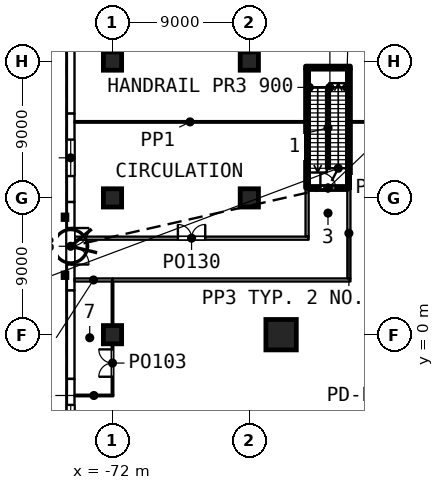
"""IFC4 building model, lengths in metres.
Left out: names, types, materials, properties, quantities, classifications, styles, units other than length and angle.
Written with IfcOpenShell. Run it as: python <this file> out.ifc"""

import sys

from ifc_helpers import new_model, si_unit, direction, frame, frame_2d, origin, origin_2d, place, context, subcontext, project, spatial, rectangle, extrude, element, fill, save


model = new_model("IFC4")
c1 = context("Model", 3, precision=1e-05, world=origin(), true_north=direction((0.0, 1.0)))
c2 = subcontext(c1, "Body", "Model", "MODEL_VIEW")
j1 = project(units=[si_unit("LENGTHUNIT", "METRE"), si_unit("PLANEANGLEUNIT", "RADIAN")], contexts=[c1])
p1 = place(None, origin())
s1 = spatial("IfcSite", under=j1, at=p1, CompositionType="ELEMENT")
p2 = place(p1, origin())
s2 = spatial("IfcBuilding", under=s1, at=p2, CompositionType="ELEMENT")
p3 = place(p2, origin())
s3 = spatial("IfcBuildingStorey", under=s2, at=p3, CompositionType="ELEMENT", Elevation=0.0)
for number, where, z_axis, x_axis in (
    (1, (-72.0, 0.0, 0.0), (0.0, 0.0, 1.0), (1.0, 0.0, 0.0)),
    (2, (-72.0, 9.0, 0.0), (0.0, 0.0, 1.0), (1.0, 0.0, 0.0)),
    (3, (-72.0, 18.0, 0.0), (0.0, 0.0, 1.0), (1.0, 0.0, 0.0)),
    (4, (-63.0, 9.0, 0.0), (0.0, 0.0, 1.0), (1.0, 0.0, 0.0)),
    (5, (-63.0, 18.0, 0.0), (0.0, 0.0, 1.0), (1.0, 0.0, 0.0)),
):
    element("IfcColumn", number, at=place(p3, frame(where, z_axis=z_axis, x_axis=x_axis)), inside=s3, PredefinedType="COLUMN", context=c2, shape_type="SweptSolid", body=[
        extrude(rectangle(XDim=1.2, YDim=1.2, at=origin_2d()), origin(), (0.0, 0.0, 1.0), 7.2),
    ])
p4 = place(p3, frame((-60.91, 0.0, 0.0), z_axis=(0.0, 0.0, 1.0), x_axis=(-1.0, 0.0, 0.0)))
e6 = element("IfcColumn", 6, at=p4, inside=s3, PredefinedType="COLUMN", context=c2, shape_type="SweptSolid", body=[
    extrude(rectangle(XDim=2.0, YDim=2.0, at=origin_2d()), origin(), (0.0, 0.0, 1.0), 7.2),
])
p5 = place(p3, frame((-74.75, 20.364, 0.0), z_axis=(0.0, 0.0, 1.0), x_axis=(0.0, -1.0, 0.0)))
e7 = element("IfcWall", 7, at=p5, inside=s3, PredefinedType="SOLIDWALL", context=c2, shape_type="SweptSolid", body=[
    extrude(rectangle(XDim=5.818, YDim=0.5, at=frame_2d((2.909, 0.0))), origin(), (0.0, 0.0, 1.0), 6.9),
])
p6 = place(p3, frame((-74.75, 14.545, 0.0), z_axis=(0.0, 0.0, 1.0), x_axis=(0.0, -1.0, 0.0)))
e8 = element("IfcWall", 8, at=p6, inside=s3, PredefinedType="SOLIDWALL", context=c2, shape_type="SweptSolid", body=[
    extrude(rectangle(XDim=5.818, YDim=0.5, at=frame_2d((2.909, 0.0))), origin(), (0.0, 0.0, 1.0), 6.9),
])
p7 = place(p6, frame((1.709, 0.0, 0.9)))
e9 = element("IfcOpeningElement", 9, at=p7, cuts=e8, PredefinedType="OPENING", context=c2, shape_type="SweptSolid", body=[
    extrude(rectangle(XDim=2.4, YDim=3.6, at=frame_2d((1.2, 1.8))), frame((0.0, 0.26, 0.0), z_axis=(0.0, -1.0, 0.0), x_axis=(1.0, 0.0, 0.0)), (0.0, 0.0, 1.0), 0.52),
])
p8 = place(p3, frame((-74.75, 8.727, 0.0), z_axis=(0.0, 0.0, 1.0), x_axis=(0.0, -1.0, 0.0)))
e10 = element("IfcWall", 10, at=p8, inside=s3, PredefinedType="SOLIDWALL", context=c2, shape_type="SweptSolid", body=[
    extrude(rectangle(XDim=5.818, YDim=0.5, at=frame_2d((2.909, 0.0))), origin(), (0.0, 0.0, 1.0), 6.9),
])
p9 = place(p8, frame((1.709, 0.0, 0.0)))
e11 = element("IfcOpeningElement", 11, at=p9, cuts=e10, PredefinedType="OPENING", context=c2, shape_type="SweptSolid", body=[
    extrude(rectangle(XDim=2.4, YDim=3.0, at=frame_2d((1.2, 1.5))), frame((0.0, 0.26, 0.0), z_axis=(0.0, -1.0, 0.0), x_axis=(1.0, 0.0, 0.0)), (0.0, 0.0, 1.0), 0.52),
])
p10 = place(p3, frame((-74.75, 2.909, 0.0), z_axis=(0.0, 0.0, 1.0), x_axis=(0.0, -1.0, 0.0)))
e12 = element("IfcWall", 12, at=p10, inside=s3, PredefinedType="SOLIDWALL", context=c2, shape_type="SweptSolid", body=[
    extrude(rectangle(XDim=5.818, YDim=0.5, at=frame_2d((2.909, 0.0))), origin(), (0.0, 0.0, 1.0), 6.9),
])
p11 = place(p3, frame((-74.75, -2.909, 0.0), z_axis=(0.0, 0.0, 1.0), x_axis=(0.0, -1.0, 0.0)))
e13 = element("IfcWall", 13, at=p11, inside=s3, PredefinedType="SOLIDWALL", context=c2, shape_type="SweptSolid", body=[
    extrude(rectangle(XDim=5.818, YDim=0.5, at=frame_2d((2.909, 0.0))), origin(), (0.0, 0.0, 1.0), 6.9),
])
p12 = place(p11, frame((1.709, 0.0, 0.9)))
e14 = element("IfcOpeningElement", 14, at=p12, cuts=e13, PredefinedType="OPENING", context=c2, shape_type="SweptSolid", body=[
    extrude(rectangle(XDim=2.4, YDim=3.6, at=frame_2d((1.2, 1.8))), frame((0.0, 0.26, 0.0), z_axis=(0.0, -1.0, 0.0), x_axis=(1.0, 0.0, 0.0)), (0.0, 0.0, 1.0), 0.52),
])
p13 = place(p3, frame((-59.1, 9.65, 0.0), z_axis=(0.0, 0.0, 1.0), x_axis=(1.0, 0.0, 0.0)))
e15 = element("IfcWall", 15, at=p13, inside=s3, PredefinedType="SOLIDWALL", context=c2, shape_type="SweptSolid", body=[
    extrude(rectangle(XDim=2.55, YDim=0.2, at=frame_2d((1.275, 0.0))), origin(), (0.0, 0.0, 1.0), 6.9),
])
p14 = place(p13, frame((0.775, 0.0, 0.0)))
e16 = element("IfcOpeningElement", 16, at=p14, cuts=e15, PredefinedType="OPENING", context=c2, shape_type="SweptSolid", body=[
    extrude(rectangle(XDim=1.0, YDim=2.1, at=frame_2d((0.5, 1.05))), frame((0.0, 0.11, 0.0), z_axis=(0.0, -1.0, 0.0), x_axis=(1.0, 0.0, 0.0)), (0.0, 0.0, 1.0), 0.22),
])
p15 = place(p3, frame((-56.45, 9.65, 0.0), z_axis=(0.0, 0.0, 1.0), x_axis=(0.0, 1.0, 0.0)))
e17 = element("IfcWall", 17, at=p15, inside=s3, PredefinedType="SOLIDWALL", context=c2, shape_type="SweptSolid", body=[
    extrude(rectangle(XDim=4.35, YDim=0.2, at=frame_2d((2.175, 0.0))), origin(), (0.0, 0.0, 1.0), 6.9),
])
p16 = place(p3, frame((-59.3, 17.57, 0.0), z_axis=(0.0, 0.0, 1.0), x_axis=(1.0, 0.0, 0.0)))
e18 = element("IfcWall", 18, at=p16, inside=s3, PredefinedType="SOLIDWALL", context=c2, shape_type="SweptSolid", body=[
    extrude(rectangle(XDim=2.95, YDim=0.2, at=frame_2d((1.475, 0.0))), origin(), (0.0, 0.0, 1.0), 6.9),
])
for number, where, z_axis, x_axis in (
    (19, (-59.2, 14.0, 0.0), (0.0, 0.0, 1.0), (0.0, 1.0, 0.0)),
    (20, (-56.45, 14.0, 0.0), (0.0, 0.0, 1.0), (0.0, 1.0, 0.0)),
):
    element("IfcWall", number, at=place(p3, frame(where, z_axis=z_axis, x_axis=x_axis)), inside=s3, PredefinedType="SOLIDWALL", context=c2, shape_type="SweptSolid", body=[
        extrude(rectangle(XDim=3.47, YDim=0.2, at=frame_2d((1.735, 0.0))), origin(), (0.0, 0.0, 1.0), 6.9),
    ])
p17 = place(p3, frame((-59.2, 9.65, 0.0), z_axis=(0.0, 0.0, 1.0), x_axis=(0.0, 1.0, 0.0)))
e21 = element("IfcWall", 21, at=p17, inside=s3, PredefinedType="SOLIDWALL", context=c2, shape_type="SweptSolid", body=[
    extrude(rectangle(XDim=4.35, YDim=0.2, at=frame_2d((2.175, 0.0))), origin(), (0.0, 0.0, 1.0), 6.9),
])
p18 = place(p3, frame((-74.5, 3.6, 0.0), z_axis=(0.0, 0.0, 1.0), x_axis=(1.0, 0.0, 0.0)))
e22 = element("IfcWall", 22, at=p18, inside=s3, PredefinedType="PARTITIONING", context=c2, shape_type="SweptSolid", body=[
    extrude(rectangle(XDim=2.5, YDim=0.2, at=frame_2d((1.25, 0.0))), origin(), (0.0, 0.0, 1.0), 6.9),
])
p19 = place(p3, frame((-72.0, 3.6, 0.0), z_axis=(0.0, 0.0, 1.0), x_axis=(1.0, 0.0, 0.0)))
e23 = element("IfcWall", 23, at=p19, inside=s3, PredefinedType="PARTITIONING", context=c2, shape_type="SweptSolid", body=[
    extrude(rectangle(XDim=15.65, YDim=0.2, at=frame_2d((7.825, 0.0))), origin(), (0.0, 0.0, 1.0), 6.9),
])
p20 = place(p3, frame((-56.45, 3.7, 0.0), z_axis=(0.0, 0.0, 1.0), x_axis=(0.0, 1.0, 0.0)))
e24 = element("IfcWall", 24, at=p20, inside=s3, PredefinedType="PARTITIONING", context=c2, shape_type="SweptSolid", body=[
    extrude(rectangle(XDim=5.95, YDim=0.2, at=frame_2d((2.975, 0.0))), origin(), (0.0, 0.0, 1.0), 6.9),
])
p21 = place(p3, frame((-74.5, 6.35, 0.0), z_axis=(0.0, 0.0, 1.0), x_axis=(1.0, 0.0, 0.0)))
e25 = element("IfcWall", 25, at=p21, inside=s3, PredefinedType="PARTITIONING", context=c2, shape_type="SweptSolid", body=[
    extrude(rectangle(XDim=15.4, YDim=0.2, at=frame_2d((7.7, 0.0))), origin(), (0.0, 0.0, 1.0), 6.9),
])
p22 = place(p21, frame((6.8, 0.0, 0.0)))
e26 = element("IfcOpeningElement", 26, at=p22, cuts=e25, PredefinedType="OPENING", context=c2, shape_type="SweptSolid", body=[
    extrude(rectangle(XDim=1.8, YDim=2.1, at=frame_2d((0.9, 1.05))), frame((0.0, 0.11, 0.0), z_axis=(0.0, -1.0, 0.0), x_axis=(1.0, 0.0, 0.0)), (0.0, 0.0, 1.0), 0.22),
])
p23 = place(p3, frame((-59.2, 6.45, 0.0), z_axis=(0.0, 0.0, 1.0), x_axis=(0.0, 1.0, 0.0)))
e27 = element("IfcWall", 27, at=p23, inside=s3, PredefinedType="PARTITIONING", context=c2, shape_type="SweptSolid", body=[
    extrude(rectangle(XDim=3.2, YDim=0.2, at=frame_2d((1.6, 0.0))), origin(), (0.0, 0.0, 1.0), 6.9),
])
p24 = place(p3, frame((-74.5, -4.0, 0.0), z_axis=(0.0, 0.0, 1.0), x_axis=(1.0, 0.0, 0.0)))
e28 = element("IfcWall", 28, at=p24, inside=s3, PredefinedType="PARTITIONING", context=c2, shape_type="SweptSolid", body=[
    extrude(rectangle(XDim=2.55, YDim=0.1, at=frame_2d((1.275, 0.0))), origin(), (0.0, 0.0, 1.0), 6.9),
])
p25 = place(p3, frame((-72.0, -3.95, 0.0), z_axis=(0.0, 0.0, 1.0), x_axis=(0.0, 1.0, 0.0)))
e29 = element("IfcWall", 29, at=p25, inside=s3, PredefinedType="PARTITIONING", context=c2, shape_type="SweptSolid", body=[
    extrude(rectangle(XDim=7.45, YDim=0.1, at=frame_2d((3.725, 0.0))), origin(), (0.0, 0.0, 1.0), 6.3),
])
p26 = place(p25, frame((1.184, 0.0, 0.0)))
e30 = element("IfcOpeningElement", 30, at=p26, cuts=e29, PredefinedType="OPENING", context=c2, shape_type="SweptSolid", body=[
    extrude(rectangle(XDim=1.8, YDim=2.1, at=frame_2d((0.9, 1.05))), frame((0.0, 0.06, 0.0), z_axis=(0.0, -1.0, 0.0), x_axis=(1.0, 0.0, 0.0)), (0.0, 0.0, 1.0), 0.12),
])
p27 = place(p3, frame((-56.35, 14.0, 0.0), z_axis=(0.0, 0.0, 1.0), x_axis=(1.0, 0.0, 0.0)))
e31 = element("IfcWall", 31, at=p27, inside=s3, PredefinedType="PARTITIONING", context=c2, shape_type="SweptSolid", body=[
    extrude(rectangle(XDim=44.3, YDim=0.1, at=frame_2d((22.15, 0.0))), origin(), (0.0, 0.0, 1.0), 6.9),
])
p28 = place(p27, frame((33.82, 0.0, 0.0)))
e32 = element("IfcOpeningElement", 32, at=p28, cuts=e31, PredefinedType="OPENING", context=c2, shape_type="SweptSolid", body=[
    extrude(rectangle(XDim=1.8, YDim=2.1, at=frame_2d((0.9, 1.05))), frame((0.0, 0.06, 0.0), z_axis=(0.0, -1.0, 0.0), x_axis=(1.0, 0.0, 0.0)), (0.0, 0.0, 1.0), 0.12),
])
p29 = place(p3, frame((-74.5, 14.0, 0.0), z_axis=(0.0, 0.0, 1.0), x_axis=(1.0, 0.0, 0.0)))
e33 = element("IfcWall", 33, at=p29, inside=s3, PredefinedType="PARTITIONING", context=c2, shape_type="SweptSolid", body=[
    extrude(rectangle(XDim=15.2, YDim=0.1, at=frame_2d((7.6, 0.0))), origin(), (0.0, 0.0, 1.0), 6.9),
])
p30 = place(p7, origin())
e34 = element("IfcWindow", 34, at=p30, inside=s3, PartitioningType="SINGLE_PANEL", PredefinedType="WINDOW", context=c2, shape_type="SweptSolid", body=[
    extrude(rectangle(XDim=2.4, YDim=3.6, at=frame_2d((1.2, 1.8))), frame((0.0, 0.03, 0.0), z_axis=(0.0, -1.0, 0.0), x_axis=(1.0, 0.0, 0.0)), (0.0, 0.0, 1.0), 0.06),
])
fill(e9, e34)
p31 = place(p9, origin())
e35 = element("IfcDoor", 35, at=p31, inside=s3, OperationType="SINGLE_SWING_LEFT", PredefinedType="DOOR", context=c2, shape_type="SweptSolid", body=[
    extrude(rectangle(XDim=2.4, YDim=3.0, at=frame_2d((1.2, 1.5))), frame((0.0, 0.025, 0.0), z_axis=(0.0, -1.0, 0.0), x_axis=(1.0, 0.0, 0.0)), (0.0, 0.0, 1.0), 0.05),
])
fill(e11, e35)
p32 = place(p12, origin())
e36 = element("IfcWindow", 36, at=p32, inside=s3, PartitioningType="SINGLE_PANEL", PredefinedType="WINDOW", context=c2, shape_type="SweptSolid", body=[
    extrude(rectangle(XDim=2.4, YDim=3.6, at=frame_2d((1.2, 1.8))), frame((0.0, 0.03, 0.0), z_axis=(0.0, -1.0, 0.0), x_axis=(1.0, 0.0, 0.0)), (0.0, 0.0, 1.0), 0.06),
])
fill(e14, e36)
p33 = place(p14, origin())
e37 = element("IfcDoor", 37, at=p33, inside=s3, OperationType="SINGLE_SWING_LEFT", PredefinedType="DOOR", context=c2, shape_type="SweptSolid", body=[
    extrude(rectangle(XDim=1.0, YDim=2.1, at=frame_2d((0.5, 1.05))), frame((0.0, 0.025, 0.0), z_axis=(0.0, -1.0, 0.0), x_axis=(1.0, 0.0, 0.0)), (0.0, 0.0, 1.0), 0.05),
])
fill(e16, e37)
p34 = place(p26, origin())
e38 = element("IfcDoor", 38, at=p34, inside=s3, OperationType="DOUBLE_DOOR_DOUBLE_SWING", PredefinedType="DOOR", context=c2, shape_type="SweptSolid", body=[
    extrude(rectangle(XDim=1.8, YDim=2.1, at=frame_2d((0.9, 1.05))), frame((0.0, 0.025, 0.0), z_axis=(0.0, -1.0, 0.0), x_axis=(1.0, 0.0, 0.0)), (0.0, 0.0, 1.0), 0.05),
])
fill(e30, e38)
p35 = place(p22, origin())
e39 = element("IfcDoor", 39, at=p35, inside=s3, OperationType="DOUBLE_DOOR_DOUBLE_SWING", PredefinedType="DOOR", context=c2, shape_type="SweptSolid", body=[
    extrude(rectangle(XDim=1.8, YDim=2.1, at=frame_2d((0.9, 1.05))), frame((0.0, 0.025, 0.0), z_axis=(0.0, -1.0, 0.0), x_axis=(1.0, 0.0, 0.0)), (0.0, 0.0, 1.0), 0.05),
])
fill(e26, e39)
save(model, sys.argv[1])
